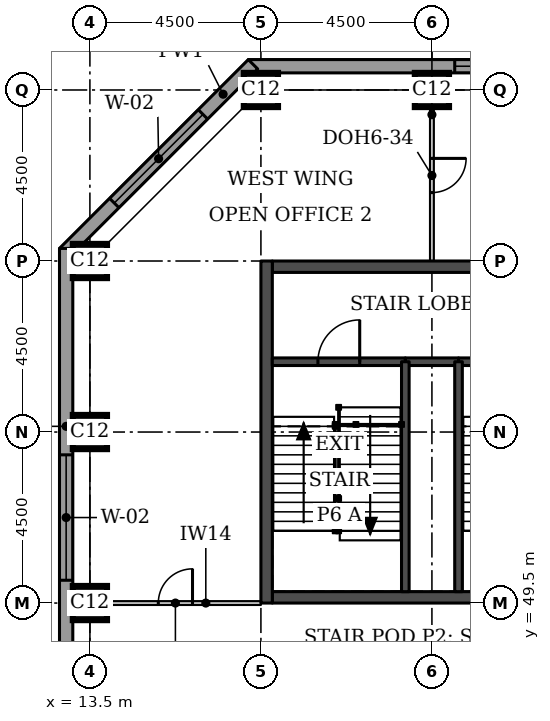
"""IFC4 building model, lengths in metres.
Left out: names, types, materials, properties, quantities, classifications, styles, units other than length and angle.
Written with IfcOpenShell. Run it as: python <this file> out.ifc"""

import sys

from ifc_helpers import new_model, si_unit, direction, frame, frame_2d, origin, origin_2d, place, context, subcontext, project, spatial, rectangle, extrude, element, fill, save


model = new_model("IFC4")
c1 = context("Model", 3, precision=1e-05, world=origin(), true_north=direction((0.0, 1.0)))
c2 = subcontext(c1, "Body", "Model", "MODEL_VIEW")
j1 = project(units=[si_unit("LENGTHUNIT", "METRE"), si_unit("PLANEANGLEUNIT", "RADIAN")], contexts=[c1])
p1 = place(None, origin())
s1 = spatial("IfcSite", under=j1, at=p1, CompositionType="ELEMENT")
p2 = place(p1, origin())
s2 = spatial("IfcBuilding", under=s1, at=p2, CompositionType="ELEMENT")
p3 = place(p2, frame((0.0, 0.0, 184.7)))
s3 = spatial("IfcBuildingStorey", under=s2, at=p3, CompositionType="ELEMENT", Elevation=184.7)
for number, where, z_axis, x_axis in (
    (1, (13.5, 49.5, 0.0), (0.0, 0.0, 1.0), (1.0, 0.0, 0.0)),
    (2, (13.5, 54.0, 0.0), (0.0, 0.0, 1.0), (1.0, 0.0, 0.0)),
    (3, (13.5, 58.5, 0.0), (0.0, 0.0, 1.0), (1.0, 0.0, 0.0)),
    (4, (18.0, 63.0, 0.0), (0.0, 0.0, 1.0), (1.0, 0.0, 0.0)),
    (5, (22.5, 63.0, 0.0), (0.0, 0.0, 1.0), (1.0, 0.0, 0.0)),
):
    element("IfcColumn", number, at=place(p3, frame(where, z_axis=z_axis, x_axis=x_axis)), inside=s3, PredefinedType="COLUMN", context=c2, shape_type="SweptSolid", body=[
        extrude(rectangle(XDim=0.9, YDim=0.9, at=origin_2d()), origin(), (0.0, 0.0, 1.0), 3.7),
    ])
for number, where, z_axis, x_axis in (
    (6, (18.3, 49.65, 0.0), (0.0, 0.0, 1.0), (1.0, 0.0, 0.0)),
    (7, (18.3, 58.35, 0.0), (0.0, 0.0, 1.0), (1.0, 0.0, 0.0)),
):
    element("IfcWall", number, at=place(p3, frame(where, z_axis=z_axis, x_axis=x_axis)), inside=s3, PredefinedType="SHEAR", context=c2, shape_type="SweptSolid", body=[
        extrude(rectangle(XDim=8.4, YDim=0.3, at=frame_2d((4.2, 0.0))), origin(), (0.0, 0.0, 1.0), 3.7),
    ])
p4 = place(p3, frame((18.15, 49.5, 0.0), z_axis=(0.0, 0.0, 1.0), x_axis=(0.0, 1.0, 0.0)))
e8 = element("IfcWall", 8, at=p4, inside=s3, PredefinedType="SHEAR", context=c2, shape_type="SweptSolid", body=[
    extrude(rectangle(XDim=9.0, YDim=0.3, at=frame_2d((4.5, 0.0))), origin(), (0.0, 0.0, 1.0), 3.7),
])
p5 = place(p3, frame((35.55, 63.625, 0.0), z_axis=(0.0, 0.0, 1.0), x_axis=(-1.0, 0.0, 0.0)))
e9 = element("IfcWall", 9, at=p5, inside=s3, PredefinedType="STANDARD", context=c2, shape_type="SweptSolid", body=[
    extrude(rectangle(XDim=17.881, YDim=0.35, at=frame_2d((8.941, 0.0))), origin(), (0.0, 0.0, 1.0), 3.525),
])
p6 = place(p5, frame((0.5, 0.0, 0.9)))
e10 = element("IfcOpeningElement", 10, at=p6, cuts=e9, PredefinedType="OPENING", context=c2, shape_type="SweptSolid", body=[
    extrude(rectangle(XDim=3.3, YDim=1.9, at=frame_2d((1.65, 0.95))), frame((0.0, 0.185, 0.0), z_axis=(0.0, -1.0, 0.0), x_axis=(1.0, 0.0, 0.0)), (0.0, 0.0, 1.0), 0.37),
])
p7 = place(p5, frame((9.15, 0.0, 0.9)))
e11 = element("IfcOpeningElement", 11, at=p7, cuts=e9, PredefinedType="OPENING", context=c2, shape_type="SweptSolid", body=[
    extrude(rectangle(XDim=3.3, YDim=1.9, at=frame_2d((1.65, 0.95))), frame((0.0, 0.185, 0.0), z_axis=(0.0, -1.0, 0.0), x_axis=(1.0, 0.0, 0.0)), (0.0, 0.0, 1.0), 0.37),
])
p8 = place(p3, frame((17.792, 63.676, 0.0), z_axis=(0.0, 0.0, 1.0), x_axis=(-0.707106781187, -0.707106781187, 0.0)))
e12 = element("IfcWall", 12, at=p8, inside=s3, PredefinedType="STANDARD", context=c2, shape_type="SweptSolid", body=[
    extrude(rectangle(XDim=7.027, YDim=0.35, at=frame_2d((3.513, 0.0))), origin(), (0.0, 0.0, 1.0), 3.525),
])
p9 = place(p8, frame((1.863, 0.0, 0.9)))
e13 = element("IfcOpeningElement", 13, at=p9, cuts=e12, PredefinedType="OPENING", context=c2, shape_type="SweptSolid", body=[
    extrude(rectangle(XDim=3.3, YDim=1.9, at=frame_2d((1.65, 0.95))), frame((0.0, 0.185, 0.0), z_axis=(0.0, -1.0, 0.0), x_axis=(1.0, 0.0, 0.0)), (0.0, 0.0, 1.0), 0.37),
])
p10 = place(p3, frame((12.875, 58.831, 0.0), z_axis=(0.0, 0.0, 1.0), x_axis=(0.0, -1.0, 0.0)))
e14 = element("IfcWall", 14, at=p10, inside=s3, PredefinedType="STANDARD", context=c2, shape_type="SweptSolid", body=[
    extrude(rectangle(XDim=14.163, YDim=0.35, at=frame_2d((7.081, 0.0))), origin(), (0.0, 0.0, 1.0), 3.525),
])
p11 = place(p10, frame((5.431, 0.0, 0.9)))
e15 = element("IfcOpeningElement", 15, at=p11, cuts=e14, PredefinedType="OPENING", context=c2, shape_type="SweptSolid", body=[
    extrude(rectangle(XDim=3.3, YDim=1.9, at=frame_2d((1.65, 0.95))), frame((0.0, 0.185, 0.0), z_axis=(0.0, -1.0, 0.0), x_axis=(1.0, 0.0, 0.0)), (0.0, 0.0, 1.0), 0.37),
])
p12 = place(p3, frame((22.5, 63.0, 0.0), z_axis=(0.0, 0.0, 1.0), x_axis=(0.0, -1.0, 0.0)))
e16 = element("IfcWall", 16, at=p12, inside=s3, PredefinedType="PARTITIONING", context=c2, shape_type="SweptSolid", body=[
    extrude(rectangle(XDim=4.5, YDim=0.1, at=frame_2d((2.25, 0.0))), origin(), (0.0, 0.0, 1.0), 3.55),
])
p13 = place(p12, frame((1.8, 0.0, 0.0)))
e17 = element("IfcOpeningElement", 17, at=p13, cuts=e16, PredefinedType="OPENING", context=c2, shape_type="SweptSolid", body=[
    extrude(rectangle(XDim=0.9, YDim=2.1, at=frame_2d((0.45, 1.05))), frame((0.0, 0.06, 0.0), z_axis=(0.0, -1.0, 0.0), x_axis=(1.0, 0.0, 0.0)), (0.0, 0.0, 1.0), 0.12),
])
p14 = place(p3, frame((13.5, 49.5, 0.0), z_axis=(0.0, 0.0, 1.0), x_axis=(1.0, 0.0, 0.0)))
e18 = element("IfcWall", 18, at=p14, inside=s3, PredefinedType="PARTITIONING", context=c2, shape_type="SweptSolid", body=[
    extrude(rectangle(XDim=4.5, YDim=0.1, at=frame_2d((2.25, 0.0))), origin(), (0.0, 0.0, 1.0), 3.55),
])
p15 = place(p14, frame((1.8, 0.0, 0.0)))
e19 = element("IfcOpeningElement", 19, at=p15, cuts=e18, PredefinedType="OPENING", context=c2, shape_type="SweptSolid", body=[
    extrude(rectangle(XDim=0.9, YDim=2.1, at=frame_2d((0.45, 1.05))), frame((0.0, 0.06, 0.0), z_axis=(0.0, -1.0, 0.0), x_axis=(1.0, 0.0, 0.0)), (0.0, 0.0, 1.0), 0.12),
])
p16 = place(p3, frame((21.8, 55.85, 0.0), z_axis=(0.0, 0.0, 1.0), x_axis=(1.0, 0.0, 0.0)))
e20 = element("IfcWall", 20, at=p16, inside=s3, PredefinedType="SOLIDWALL", context=c2, shape_type="SweptSolid", body=[
    extrude(rectangle(XDim=1.4, YDim=0.2, at=frame_2d((0.7, 0.0))), origin(), (0.0, 0.0, 1.0), 3.55),
])
p17 = place(p3, frame((18.3, 55.85, 0.0), z_axis=(0.0, 0.0, 1.0), x_axis=(1.0, 0.0, 0.0)))
e21 = element("IfcWall", 21, at=p17, inside=s3, PredefinedType="SOLIDWALL", context=c2, shape_type="SweptSolid", body=[
    extrude(rectangle(XDim=3.5, YDim=0.2, at=frame_2d((1.75, 0.0))), origin(), (0.0, 0.0, 1.0), 3.55),
])
p18 = place(p17, frame((1.2, 0.0, 0.0)))
e22 = element("IfcOpeningElement", 22, at=p18, cuts=e21, PredefinedType="OPENING", context=c2, shape_type="SweptSolid", body=[
    extrude(rectangle(XDim=1.1, YDim=2.1, at=frame_2d((0.55, 1.05))), frame((0.0, 0.11, 0.0), z_axis=(0.0, -1.0, 0.0), x_axis=(1.0, 0.0, 0.0)), (0.0, 0.0, 1.0), 0.22),
])
p19 = place(p3, frame((23.2, 55.85, 0.0), z_axis=(0.0, 0.0, 1.0), x_axis=(1.0, 0.0, 0.0)))
e23 = element("IfcWall", 23, at=p19, inside=s3, PredefinedType="SOLIDWALL", context=c2, shape_type="SweptSolid", body=[
    extrude(rectangle(XDim=3.5, YDim=0.2, at=frame_2d((1.75, 0.0))), origin(), (0.0, 0.0, 1.0), 3.55),
])
p20 = place(p19, frame((1.2, 0.0, 0.0)))
e24 = element("IfcOpeningElement", 24, at=p20, cuts=e23, PredefinedType="OPENING", context=c2, shape_type="SweptSolid", body=[
    extrude(rectangle(XDim=1.1, YDim=2.1, at=frame_2d((0.55, 1.05))), frame((0.0, 0.11, 0.0), z_axis=(0.0, -1.0, 0.0), x_axis=(1.0, 0.0, 0.0)), (0.0, 0.0, 1.0), 0.22),
])
for number, where, z_axis, x_axis in (
    (25, (21.8, 49.8, 0.0), (0.0, 0.0, 1.0), (0.0, 1.0, 0.0)),
    (26, (23.2, 49.8, 0.0), (0.0, 0.0, 1.0), (0.0, 1.0, 0.0)),
):
    element("IfcWall", number, at=place(p3, frame(where, z_axis=z_axis, x_axis=x_axis)), inside=s3, PredefinedType="SOLIDWALL", context=c2, shape_type="SweptSolid", body=[
        extrude(rectangle(XDim=6.05, YDim=0.2, at=frame_2d((3.025, 0.0))), origin(), (0.0, 0.0, 1.0), 3.55),
    ])
p21 = place(p7, origin())
e27 = element("IfcWindow", 27, at=p21, inside=s3, PartitioningType="SINGLE_PANEL", PredefinedType="WINDOW", context=c2, shape_type="SweptSolid", body=[
    extrude(rectangle(XDim=3.3, YDim=1.9, at=frame_2d((1.65, 0.95))), frame((0.0, 0.085, 0.0), z_axis=(0.0, -1.0, 0.0), x_axis=(1.0, 0.0, 0.0)), (0.0, 0.0, 1.0), 0.06),
])
fill(e11, e27)
p22 = place(p9, origin())
e28 = element("IfcWindow", 28, at=p22, inside=s3, PartitioningType="SINGLE_PANEL", PredefinedType="WINDOW", context=c2, shape_type="SweptSolid", body=[
    extrude(rectangle(XDim=3.3, YDim=1.9, at=frame_2d((1.65, 0.95))), frame((0.0, 0.085, 0.0), z_axis=(0.0, -1.0, 0.0), x_axis=(1.0, 0.0, 0.0)), (0.0, 0.0, 1.0), 0.06),
])
fill(e13, e28)
p23 = place(p11, origin())
e29 = element("IfcWindow", 29, at=p23, inside=s3, PartitioningType="SINGLE_PANEL", PredefinedType="WINDOW", context=c2, shape_type="SweptSolid", body=[
    extrude(rectangle(XDim=3.3, YDim=1.9, at=frame_2d((1.65, 0.95))), frame((0.0, 0.085, 0.0), z_axis=(0.0, -1.0, 0.0), x_axis=(1.0, 0.0, 0.0)), (0.0, 0.0, 1.0), 0.06),
])
fill(e15, e29)
p24 = place(p13, origin())
e30 = element("IfcDoor", 30, at=p24, inside=s3, OperationType="SINGLE_SWING_LEFT", PredefinedType="DOOR", context=c2, shape_type="SweptSolid", body=[
    extrude(rectangle(XDim=0.9, YDim=2.1, at=frame_2d((0.45, 1.05))), frame((0.0, 0.025, 0.0), z_axis=(0.0, -1.0, 0.0), x_axis=(1.0, 0.0, 0.0)), (0.0, 0.0, 1.0), 0.05),
])
fill(e17, e30)
p25 = place(p15, origin())
e31 = element("IfcDoor", 31, at=p25, inside=s3, OperationType="SINGLE_SWING_RIGHT", PredefinedType="DOOR", context=c2, shape_type="SweptSolid", body=[
    extrude(rectangle(XDim=0.9, YDim=2.1, at=frame_2d((0.45, 1.05))), frame((0.0, 0.025, 0.0), z_axis=(0.0, -1.0, 0.0), x_axis=(1.0, 0.0, 0.0)), (0.0, 0.0, 1.0), 0.05),
])
fill(e19, e31)
p26 = place(p18, origin())
e32 = element("IfcDoor", 32, at=p26, inside=s3, OperationType="SINGLE_SWING_RIGHT", PredefinedType="DOOR", context=c2, shape_type="SweptSolid", body=[
    extrude(rectangle(XDim=1.1, YDim=2.1, at=frame_2d((0.55, 1.05))), frame((0.0, 0.025, 0.0), z_axis=(0.0, -1.0, 0.0), x_axis=(1.0, 0.0, 0.0)), (0.0, 0.0, 1.0), 0.05),
])
fill(e22, e32)
save(model, sys.argv[1])
